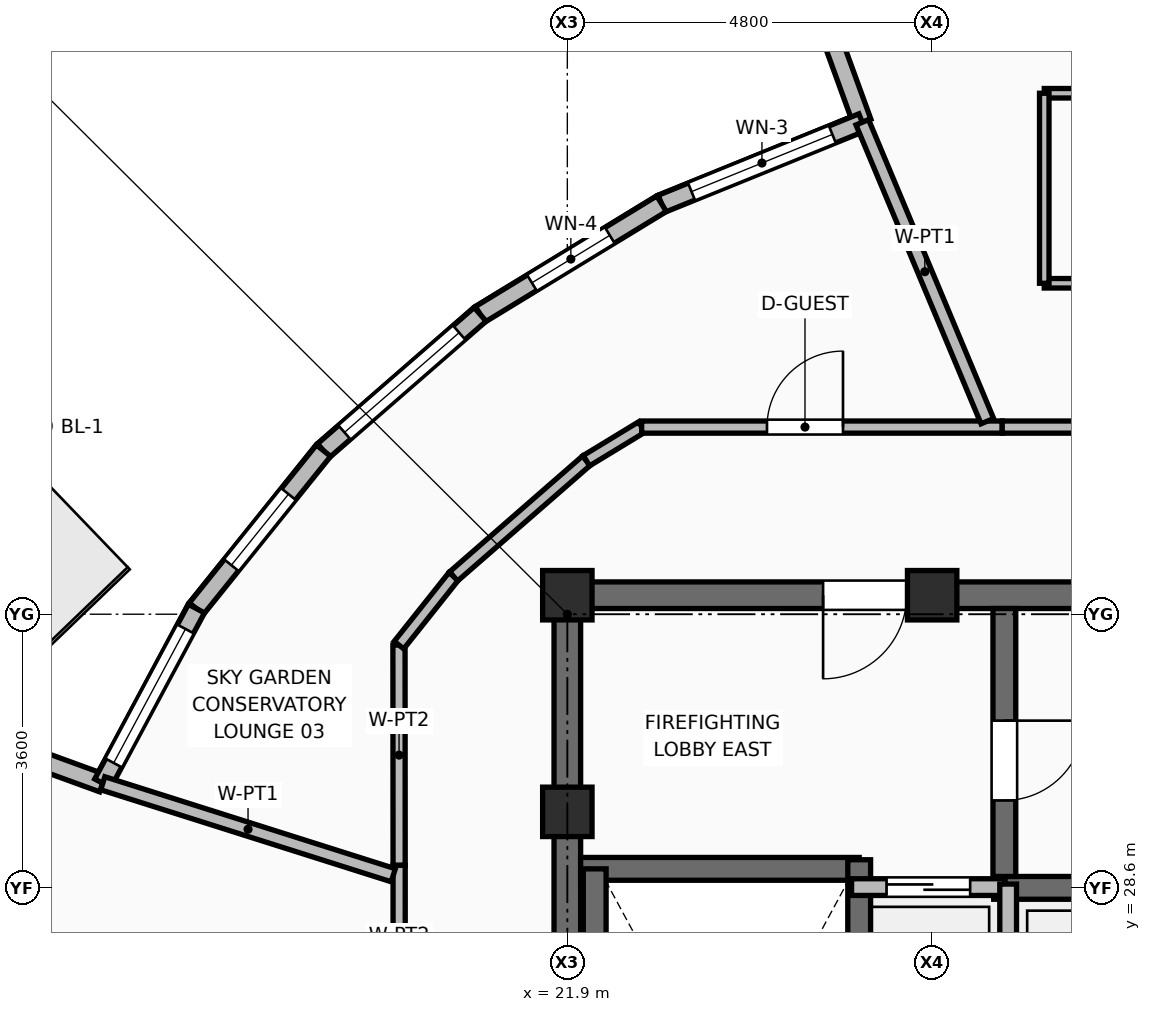
"""IFC4 building model, lengths in metres.
Left out: names, types, materials, properties, quantities, classifications, styles, units other than length and angle.
Written with IfcOpenShell. Run it as: python <this file> out.ifc"""

import sys

from ifc_helpers import new_model, si_unit, direction, frame, frame_2d, origin, origin_2d, place, context, subcontext, project, spatial, rectangle, extrude, element, fill, save


model = new_model("IFC4")
c1 = context("Model", 3, precision=1e-05, world=origin(), true_north=direction((0.0, 1.0)))
c2 = subcontext(c1, "Body", "Model", "MODEL_VIEW")
j1 = project(units=[si_unit("LENGTHUNIT", "METRE"), si_unit("PLANEANGLEUNIT", "RADIAN")], contexts=[c1])
p1 = place(None, origin())
s1 = spatial("IfcSite", under=j1, at=p1, CompositionType="ELEMENT")
p2 = place(p1, origin())
s2 = spatial("IfcBuilding", under=s1, at=p2, CompositionType="ELEMENT")
p3 = place(p2, frame((0.0, 0.0, 271.35)))
s3 = spatial("IfcBuildingStorey", under=s2, at=p3, CompositionType="ELEMENT", Elevation=271.35)
for number, where, z_axis, x_axis in (
    (1, (21.9, 29.6, 0.0), (0.0, 0.0, 1.0), (1.0, 0.0, 0.0)),
    (2, (21.9, 32.45, 0.0), (0.0, 0.0, 1.0), (1.0, 0.0, 0.0)),
    (3, (26.7, 32.45, 0.0), (0.0, 0.0, 1.0), (1.0, 0.0, 0.0)),
):
    element("IfcColumn", number, at=place(p3, frame(where, z_axis=z_axis, x_axis=x_axis)), inside=s3, PredefinedType="COLUMN", context=c2, shape_type="SweptSolid", body=[
        extrude(rectangle(XDim=0.65, YDim=0.65, at=origin_2d()), origin(), (0.0, 0.0, 1.0), 3.75),
    ])
p4 = place(p3, frame((24.619, 41.867, 0.0), z_axis=(0.0, 0.0, 1.0), x_axis=(0.341835319025, -0.939759870747, 0.0)))
e4 = element("IfcWall", 4, at=p4, inside=s3, PredefinedType="SOLIDWALL", context=c2, shape_type="SweptSolid", body=[
    extrude(rectangle(XDim=3.4, YDim=0.24, at=frame_2d((1.7, 0.0))), origin(), (0.0, 0.0, 1.0), 3.57),
])
p5 = place(p3, frame((15.788, 29.976, 0.0), z_axis=(0.0, 0.0, 1.0), x_axis=(-0.939699046647, 0.342002487902, 0.0)))
e5 = element("IfcWall", 5, at=p5, inside=s3, PredefinedType="SOLIDWALL", context=c2, shape_type="SweptSolid", body=[
    extrude(rectangle(XDim=3.4, YDim=0.24, at=frame_2d((1.7, 0.0))), origin(), (0.0, 0.0, 1.0), 3.57),
])
p6 = place(p3, frame((25.781, 38.672, 0.0), z_axis=(0.0, 0.0, 1.0), x_axis=(-0.926580401984, -0.37609674109, 0.0)))
e6 = element("IfcWall", 6, at=p6, inside=s3, PredefinedType="SOLIDWALL", context=c2, shape_type="SweptSolid", body=[
    extrude(rectangle(XDim=2.85, YDim=0.24, at=frame_2d((1.425, 0.0))), origin(), (0.0, 0.0, 1.0), 3.57),
])
p7 = place(p6, frame((0.425, 0.0, 0.85)))
e7 = element("IfcOpeningElement", 7, at=p7, cuts=e6, PredefinedType="OPENING", context=c2, shape_type="SweptSolid", body=[
    extrude(rectangle(XDim=2.0, YDim=2.4, at=frame_2d((1.0, 1.2))), frame((0.0, 0.13, 0.0), z_axis=(0.0, -1.0, 0.0), x_axis=(1.0, 0.0, 0.0)), (0.0, 0.0, 1.0), 0.26),
])
p8 = place(p3, frame((23.14, 37.6, 0.0), z_axis=(0.0, 0.0, 1.0), x_axis=(-0.853857712161, -0.520506491202, 0.0)))
e8 = element("IfcWall", 8, at=p8, inside=s3, PredefinedType="SOLIDWALL", context=c2, shape_type="SweptSolid", body=[
    extrude(rectangle(XDim=2.795, YDim=0.24, at=frame_2d((1.398, 0.0))), origin(), (0.0, 0.0, 1.0), 3.57),
])
p9 = place(p8, frame((0.798, 0.0, 0.85)))
e9 = element("IfcOpeningElement", 9, at=p9, cuts=e8, PredefinedType="OPENING", context=c2, shape_type="SweptSolid", body=[
    extrude(rectangle(XDim=1.2, YDim=1.8, at=frame_2d((0.6, 0.9))), frame((0.0, 0.13, 0.0), z_axis=(0.0, -1.0, 0.0), x_axis=(1.0, 0.0, 0.0)), (0.0, 0.0, 1.0), 0.26),
])
p10 = place(p3, frame((20.753, 36.145, 0.0), z_axis=(0.0, 0.0, 1.0), x_axis=(-0.754466976039, -0.656338009006, 0.0)))
e10 = element("IfcWall", 10, at=p10, inside=s3, PredefinedType="SOLIDWALL", context=c2, shape_type="SweptSolid", body=[
    extrude(rectangle(XDim=2.732, YDim=0.24, at=frame_2d((1.366, 0.0))), origin(), (0.0, 0.0, 1.0), 3.57),
])
p11 = place(p10, frame((0.366, 0.0, 0.85)))
e11 = element("IfcOpeningElement", 11, at=p11, cuts=e10, PredefinedType="OPENING", context=c2, shape_type="SweptSolid", body=[
    extrude(rectangle(XDim=2.0, YDim=2.4, at=frame_2d((1.0, 1.2))), frame((0.0, 0.13, 0.0), z_axis=(0.0, -1.0, 0.0), x_axis=(1.0, 0.0, 0.0)), (0.0, 0.0, 1.0), 0.26),
])
p12 = place(p3, frame((18.692, 34.352, 0.0), z_axis=(0.0, 0.0, 1.0), x_axis=(-0.626835967665, -0.779151249528, 0.0)))
e12 = element("IfcWall", 12, at=p12, inside=s3, PredefinedType="SOLIDWALL", context=c2, shape_type="SweptSolid", body=[
    extrude(rectangle(XDim=2.667, YDim=0.24, at=frame_2d((1.333, 0.0))), origin(), (0.0, 0.0, 1.0), 3.57),
])
p13 = place(p12, frame((0.734, 0.0, 0.85)))
e13 = element("IfcOpeningElement", 13, at=p13, cuts=e12, PredefinedType="OPENING", context=c2, shape_type="SweptSolid", body=[
    extrude(rectangle(XDim=1.2, YDim=1.8, at=frame_2d((0.6, 0.9))), frame((0.0, 0.13, 0.0), z_axis=(0.0, -1.0, 0.0), x_axis=(1.0, 0.0, 0.0)), (0.0, 0.0, 1.0), 0.26),
])
p14 = place(p3, frame((17.02, 32.274, 0.0), z_axis=(0.0, 0.0, 1.0), x_axis=(-0.472502026954, -0.881329583371, 0.0)))
e14 = element("IfcWall", 14, at=p14, inside=s3, PredefinedType="SOLIDWALL", context=c2, shape_type="SweptSolid", body=[
    extrude(rectangle(XDim=2.607, YDim=0.24, at=frame_2d((1.304, 0.0))), origin(), (0.0, 0.0, 1.0), 3.57),
])
p15 = place(p14, frame((0.304, 0.0, 0.85)))
e15 = element("IfcOpeningElement", 15, at=p15, cuts=e14, PredefinedType="OPENING", context=c2, shape_type="SweptSolid", body=[
    extrude(rectangle(XDim=2.0, YDim=2.4, at=frame_2d((1.0, 1.2))), frame((0.0, 0.13, 0.0), z_axis=(0.0, -1.0, 0.0), x_axis=(1.0, 0.0, 0.0)), (0.0, 0.0, 1.0), 0.26),
])
p16 = place(p3, frame((21.725, 32.45, 0.0), z_axis=(0.0, 0.0, 1.0), x_axis=(1.0, 0.0, 0.0)))
e16 = element("IfcWall", 16, at=p16, inside=s3, PredefinedType="SHEAR", context=c2, shape_type="SweptSolid", body=[
    extrude(rectangle(XDim=19.55, YDim=0.35, at=frame_2d((9.775, 0.0))), origin(), (0.0, 0.0, 1.0), 3.57),
])
p17 = place(p16, frame((3.54, 0.0, 0.0)))
e17 = element("IfcOpeningElement", 17, at=p17, cuts=e16, PredefinedType="OPENING", context=c2, shape_type="SweptSolid", body=[
    extrude(rectangle(XDim=1.1, YDim=2.1, at=frame_2d((0.55, 1.05))), frame((0.0, 0.185, 0.0), z_axis=(0.0, -1.0, 0.0), x_axis=(1.0, 0.0, 0.0)), (0.0, 0.0, 1.0), 0.37),
])
p18 = place(p16, frame((15.415, 0.0, 0.0)))
e18 = element("IfcOpeningElement", 18, at=p18, cuts=e16, PredefinedType="OPENING", context=c2, shape_type="SweptSolid", body=[
    extrude(rectangle(XDim=1.0, YDim=2.1, at=frame_2d((0.5, 1.05))), frame((0.0, 0.185, 0.0), z_axis=(0.0, -1.0, 0.0), x_axis=(1.0, 0.0, 0.0)), (0.0, 0.0, 1.0), 0.37),
])
p19 = place(p16, frame((17.425, 0.0, 0.0)))
e19 = element("IfcOpeningElement", 19, at=p19, cuts=e16, PredefinedType="OPENING", context=c2, shape_type="SweptSolid", body=[
    extrude(rectangle(XDim=0.9, YDim=2.1, at=frame_2d((0.45, 1.05))), frame((0.0, 0.185, 0.0), z_axis=(0.0, -1.0, 0.0), x_axis=(1.0, 0.0, 0.0)), (0.0, 0.0, 1.0), 0.37),
])
p20 = place(p3, frame((21.9, 17.975, 0.0), z_axis=(0.0, 0.0, 1.0), x_axis=(0.0, 1.0, 0.0)))
e20 = element("IfcWall", 20, at=p20, inside=s3, PredefinedType="SHEAR", context=c2, shape_type="SweptSolid", body=[
    extrude(rectangle(XDim=14.3, YDim=0.35, at=frame_2d((7.15, 0.0))), origin(), (0.0, 0.0, 1.0), 3.57),
])
p21 = place(p3, frame((22.075, 28.85, 0.0), z_axis=(0.0, 0.0, 1.0), x_axis=(1.0, 0.0, 0.0)))
e21 = element("IfcWall", 21, at=p21, inside=s3, PredefinedType="SHEAR", context=c2, shape_type="SweptSolid", body=[
    extrude(rectangle(XDim=3.665, YDim=0.3, at=frame_2d((1.833, 0.0))), origin(), (0.0, 0.0, 1.0), 3.57),
])
p22 = place(p3, frame((25.74, 20.98, 0.0), z_axis=(0.0, 0.0, 1.0), x_axis=(0.0, 1.0, 0.0)))
e22 = element("IfcWall", 22, at=p22, inside=s3, PredefinedType="SHEAR", context=c2, shape_type="SweptSolid", body=[
    extrude(rectangle(XDim=7.99, YDim=0.3, at=frame_2d((3.995, 0.0))), origin(), (0.0, 0.0, 1.0), 3.57),
])
p23 = place(p3, frame((22.26, 21.1, 0.0), z_axis=(0.0, 0.0, 1.0), x_axis=(0.0, 1.0, 0.0)))
e23 = element("IfcWall", 23, at=p23, inside=s3, PredefinedType="SHEAR", context=c2, shape_type="SweptSolid", body=[
    extrude(rectangle(XDim=7.75, YDim=0.3, at=frame_2d((3.875, 0.0))), origin(), (0.0, 0.0, 1.0), 3.57),
])
p24 = place(p3, frame((27.51, 28.6, 0.0), z_axis=(0.0, 0.0, 1.0), x_axis=(1.0, 0.0, 0.0)))
e24 = element("IfcWall", 24, at=p24, inside=s3, PredefinedType="SHEAR", context=c2, shape_type="SweptSolid", body=[
    extrude(rectangle(XDim=8.03, YDim=0.3, at=frame_2d((4.015, 0.0))), origin(), (0.0, 0.0, 1.0), 3.57),
])
p25 = place(p3, frame((27.65, 28.75, 0.0), z_axis=(0.0, 0.0, 1.0), x_axis=(0.0, 1.0, 0.0)))
e25 = element("IfcWall", 25, at=p25, inside=s3, PredefinedType="SHEAR", context=c2, shape_type="SweptSolid", body=[
    extrude(rectangle(XDim=3.525, YDim=0.3, at=frame_2d((1.762, 0.0))), origin(), (0.0, 0.0, 1.0), 3.57),
])
p26 = place(p25, frame((1.0, 0.0, 0.0)))
e26 = element("IfcOpeningElement", 26, at=p26, cuts=e25, PredefinedType="OPENING", context=c2, shape_type="SweptSolid", body=[
    extrude(rectangle(XDim=1.05, YDim=2.1, at=frame_2d((0.525, 1.05))), frame((0.0, 0.16, 0.0), z_axis=(0.0, -1.0, 0.0), x_axis=(1.0, 0.0, 0.0)), (0.0, 0.0, 1.0), 0.32),
])
p27 = place(p3, frame((25.64, 28.61, 0.0), z_axis=(0.0, 0.0, 1.0), x_axis=(1.0, 0.0, 0.0)))
e27 = element("IfcWall", 27, at=p27, inside=s3, PredefinedType="PARTITIONING", context=c2, shape_type="SweptSolid", body=[
    extrude(rectangle(XDim=2.02, YDim=0.22, at=frame_2d((1.01, 0.0))), origin(), (0.0, 0.0, 1.0), 3.55),
])
p28 = place(p27, frame((0.46, 0.0, 0.0)))
e28 = element("IfcOpeningElement", 28, at=p28, cuts=e27, PredefinedType="OPENING", context=c2, shape_type="SweptSolid", body=[
    extrude(rectangle(XDim=1.1, YDim=2.2, at=frame_2d((0.55, 1.1))), frame((0.0, 0.12, 0.0), z_axis=(0.0, -1.0, 0.0), x_axis=(1.0, 0.0, 0.0)), (0.0, 0.0, 1.0), 0.24),
])
p29 = place(p3, frame((27.7, 25.65, 0.0), z_axis=(0.0, 0.0, 1.0), x_axis=(0.0, 1.0, 0.0)))
e29 = element("IfcWall", 29, at=p29, inside=s3, PredefinedType="PARTITIONING", context=c2, shape_type="SweptSolid", body=[
    extrude(rectangle(XDim=3.0, YDim=0.22, at=frame_2d((1.5, 0.0))), origin(), (0.0, 0.0, 1.0), 3.55),
])
p30 = place(p3, frame((19.688, 26.135, 0.0), z_axis=(0.0, 0.0, 1.0), x_axis=(-0.000353325656, 0.99999993758, 0.0)))
e30 = element("IfcWall", 30, at=p30, inside=s3, PredefinedType="PARTITIONING", context=c2, shape_type="SweptSolid", body=[
    extrude(rectangle(XDim=2.764, YDim=0.16, at=frame_2d((1.382, 0.0))), origin(), (0.0, 0.0, 1.0), 3.55),
])
p31 = place(p3, frame((19.687, 28.899, 0.0), z_axis=(0.0, 0.0, 1.0), x_axis=(-0.000674649872, 0.999999772424, 0.0)))
e31 = element("IfcWall", 31, at=p31, inside=s3, PredefinedType="PARTITIONING", context=c2, shape_type="SweptSolid", body=[
    extrude(rectangle(XDim=2.895, YDim=0.16, at=frame_2d((1.448, 0.0))), origin(), (0.0, 0.0, 1.0), 3.55),
])
p32 = place(p3, frame((19.685, 31.794, 0.0), z_axis=(0.0, 0.0, 1.0), x_axis=(0.622450012277, 0.782659557033, 0.0)))
e32 = element("IfcWall", 32, at=p32, inside=s3, PredefinedType="PARTITIONING", context=c2, shape_type="SweptSolid", body=[
    extrude(rectangle(XDim=1.155, YDim=0.16, at=frame_2d((0.578, 0.0))), origin(), (0.0, 0.0, 1.0), 3.132),
])
p33 = place(p3, frame((20.404, 32.698, 0.0), z_axis=(0.0, 0.0, 1.0), x_axis=(0.753965421059, 0.656914106902, 0.0)))
e33 = element("IfcWall", 33, at=p33, inside=s3, PredefinedType="PARTITIONING", context=c2, shape_type="SweptSolid", body=[
    extrude(rectangle(XDim=2.317, YDim=0.16, at=frame_2d((1.158, 0.0))), origin(), (0.0, 0.0, 1.0), 3.132),
])
p34 = place(p3, frame((22.151, 34.22, 0.0), z_axis=(0.0, 0.0, 1.0), x_axis=(0.854414553901, 0.519591926499, 0.0)))
e34 = element("IfcWall", 34, at=p34, inside=s3, PredefinedType="PARTITIONING", context=c2, shape_type="SweptSolid", body=[
    extrude(rectangle(XDim=0.851, YDim=0.16, at=frame_2d((0.425, 0.0))), origin(), (0.0, 0.0, 1.0), 3.55),
])
p35 = place(p3, frame((22.878, 34.662, 0.0), z_axis=(0.0, 0.0, 1.0), x_axis=(1.0, 0.0, 0.0)))
e35 = element("IfcWall", 35, at=p35, inside=s3, PredefinedType="PARTITIONING", context=c2, shape_type="SweptSolid", body=[
    extrude(rectangle(XDim=4.744, YDim=0.16, at=frame_2d((2.372, 0.0))), origin(), (0.0, 0.0, 1.0), 3.55),
])
p36 = place(p35, frame((1.649, 0.0, 0.0)))
e36 = element("IfcOpeningElement", 36, at=p36, cuts=e35, PredefinedType="OPENING", context=c2, shape_type="SweptSolid", body=[
    extrude(rectangle(XDim=1.0, YDim=2.1, at=frame_2d((0.5, 1.05))), frame((0.0, 0.09, 0.0), z_axis=(0.0, -1.0, 0.0), x_axis=(1.0, 0.0, 0.0)), (0.0, 0.0, 1.0), 0.18),
])
p37 = place(p3, frame((27.622, 34.662, 0.0), z_axis=(0.0, 0.0, 1.0), x_axis=(0.999999992594, -0.000121704841, 0.0)))
e37 = element("IfcWall", 37, at=p37, inside=s3, PredefinedType="PARTITIONING", context=c2, shape_type="SweptSolid", body=[
    extrude(rectangle(XDim=10.03, YDim=0.16, at=frame_2d((5.015, 0.0))), origin(), (0.0, 0.0, 1.0), 3.132),
])
p38 = place(p37, frame((4.34, 0.0, 0.0)))
e38 = element("IfcOpeningElement", 38, at=p38, cuts=e37, PredefinedType="OPENING", context=c2, shape_type="SweptSolid", body=[
    extrude(rectangle(XDim=1.2, YDim=2.1, at=frame_2d((0.6, 1.05))), frame((0.0, 0.09, 0.0), z_axis=(0.0, -1.0, 0.0), x_axis=(1.0, 0.0, 0.0)), (0.0, 0.0, 1.0), 0.18),
])
p39 = place(p3, frame((27.426, 34.74, 0.0), z_axis=(0.0, 0.0, 1.0), x_axis=(-0.385940860764, 0.922523523815, 0.0)))
e39 = element("IfcWall", 39, at=p39, inside=s3, PredefinedType="PARTITIONING", context=c2, shape_type="SweptSolid", body=[
    extrude(rectangle(XDim=4.262, YDim=0.18, at=frame_2d((2.131, 0.0))), origin(), (0.0, 0.0, 1.0), 3.55),
])
p40 = place(p3, frame((19.61, 28.766, 0.0), z_axis=(0.0, 0.0, 1.0), x_axis=(-0.953367052014, 0.301813293502, 0.0)))
e40 = element("IfcWall", 40, at=p40, inside=s3, PredefinedType="PARTITIONING", context=c2, shape_type="SweptSolid", body=[
    extrude(rectangle(XDim=4.009, YDim=0.18, at=frame_2d((2.004, 0.0))), origin(), (0.0, 0.0, 1.0), 3.55),
])
p41 = place(p3, frame((28.175, 36.554, 0.0), z_axis=(0.0, 0.0, 1.0), x_axis=(1.0, 0.0, 0.0)))
e41 = element("IfcWall", 41, at=p41, inside=s3, PredefinedType="PARTITIONING", context=c2, shape_type="SweptSolid", body=[
    extrude(rectangle(XDim=2.6, YDim=0.125, at=frame_2d((1.3, 0.0))), origin(), (0.0, 0.0, 1.0), 3.55),
])
p42 = place(p41, frame((0.85, 0.0, 0.0)))
e42 = element("IfcOpeningElement", 42, at=p42, cuts=e41, PredefinedType="OPENING", context=c2, shape_type="SweptSolid", body=[
    extrude(rectangle(XDim=0.9, YDim=2.1, at=frame_2d((0.45, 1.05))), frame((0.0, 0.073, 0.0), z_axis=(0.0, -1.0, 0.0), x_axis=(1.0, 0.0, 0.0)), (0.0, 0.0, 1.0), 0.145),
])
p43 = place(p3, frame((28.175, 39.054, 0.0), z_axis=(0.0, 0.0, 1.0), x_axis=(1.0, 0.0, 0.0)))
e43 = element("IfcWall", 43, at=p43, inside=s3, PredefinedType="PARTITIONING", context=c2, shape_type="SweptSolid", body=[
    extrude(rectangle(XDim=2.6, YDim=0.125, at=frame_2d((1.3, 0.0))), origin(), (0.0, 0.0, 1.0), 3.55),
])
p44 = place(p3, frame((28.175, 36.554, 0.0), z_axis=(0.0, 0.0, 1.0), x_axis=(0.0, 1.0, 0.0)))
e44 = element("IfcWall", 44, at=p44, inside=s3, PredefinedType="PARTITIONING", context=c2, shape_type="SweptSolid", body=[
    extrude(rectangle(XDim=2.5, YDim=0.125, at=frame_2d((1.25, 0.0))), origin(), (0.0, 0.0, 1.0), 3.55),
])
p45 = place(p7, origin())
e45 = element("IfcWindow", 45, at=p45, inside=s3, PartitioningType="SINGLE_PANEL", PredefinedType="WINDOW", context=c2, shape_type="SweptSolid", body=[
    extrude(rectangle(XDim=2.0, YDim=2.4, at=frame_2d((1.0, 1.2))), frame((0.0, 0.03, 0.0), z_axis=(0.0, -1.0, 0.0), x_axis=(1.0, 0.0, 0.0)), (0.0, 0.0, 1.0), 0.06),
])
fill(e7, e45)
p46 = place(p9, origin())
e46 = element("IfcWindow", 46, at=p46, inside=s3, PartitioningType="SINGLE_PANEL", PredefinedType="WINDOW", context=c2, shape_type="SweptSolid", body=[
    extrude(rectangle(XDim=1.2, YDim=1.8, at=frame_2d((0.6, 0.9))), frame((0.0, 0.03, 0.0), z_axis=(0.0, -1.0, 0.0), x_axis=(1.0, 0.0, 0.0)), (0.0, 0.0, 1.0), 0.06),
])
fill(e9, e46)
p47 = place(p11, origin())
e47 = element("IfcWindow", 47, at=p47, inside=s3, PartitioningType="SINGLE_PANEL", PredefinedType="WINDOW", context=c2, shape_type="SweptSolid", body=[
    extrude(rectangle(XDim=2.0, YDim=2.4, at=frame_2d((1.0, 1.2))), frame((0.0, 0.03, 0.0), z_axis=(0.0, -1.0, 0.0), x_axis=(1.0, 0.0, 0.0)), (0.0, 0.0, 1.0), 0.06),
])
fill(e11, e47)
p48 = place(p13, origin())
e48 = element("IfcWindow", 48, at=p48, inside=s3, PartitioningType="SINGLE_PANEL", PredefinedType="WINDOW", context=c2, shape_type="SweptSolid", body=[
    extrude(rectangle(XDim=1.2, YDim=1.8, at=frame_2d((0.6, 0.9))), frame((0.0, 0.03, 0.0), z_axis=(0.0, -1.0, 0.0), x_axis=(1.0, 0.0, 0.0)), (0.0, 0.0, 1.0), 0.06),
])
fill(e13, e48)
p49 = place(p15, origin())
e49 = element("IfcWindow", 49, at=p49, inside=s3, PartitioningType="SINGLE_PANEL", PredefinedType="WINDOW", context=c2, shape_type="SweptSolid", body=[
    extrude(rectangle(XDim=2.0, YDim=2.4, at=frame_2d((1.0, 1.2))), frame((0.0, 0.03, 0.0), z_axis=(0.0, -1.0, 0.0), x_axis=(1.0, 0.0, 0.0)), (0.0, 0.0, 1.0), 0.06),
])
fill(e15, e49)
p50 = place(p26, frame((1.05, 0.0, 0.0), z_axis=(0.0, 0.0, 1.0), x_axis=(-1.0, 0.0, 0.0)))
e50 = element("IfcDoor", 50, at=p50, inside=s3, OperationType="SINGLE_SWING_LEFT", PredefinedType="DOOR", context=c2, shape_type="SweptSolid", body=[
    extrude(rectangle(XDim=1.05, YDim=2.1, at=frame_2d((0.525, 1.05))), frame((0.0, 0.025, 0.0), z_axis=(0.0, -1.0, 0.0), x_axis=(1.0, 0.0, 0.0)), (0.0, 0.0, 1.0), 0.05),
])
fill(e26, e50)
p51 = place(p28, origin())
e51 = element("IfcDoor", 51, at=p51, inside=s3, OperationType="DOUBLE_DOOR_SLIDING", PredefinedType="DOOR", context=c2, shape_type="SweptSolid", body=[
    extrude(rectangle(XDim=1.1, YDim=2.2, at=frame_2d((0.55, 1.1))), frame((0.0, 0.025, 0.0), z_axis=(0.0, -1.0, 0.0), x_axis=(1.0, 0.0, 0.0)), (0.0, 0.0, 1.0), 0.05),
])
fill(e28, e51)
p52 = place(p17, frame((1.1, 0.0, 0.0), z_axis=(0.0, 0.0, 1.0), x_axis=(-1.0, 0.0, 0.0)))
e52 = element("IfcDoor", 52, at=p52, inside=s3, OperationType="SINGLE_SWING_RIGHT", PredefinedType="DOOR", context=c2, shape_type="SweptSolid", body=[
    extrude(rectangle(XDim=1.1, YDim=2.1, at=frame_2d((0.55, 1.05))), frame((0.0, 0.025, 0.0), z_axis=(0.0, -1.0, 0.0), x_axis=(1.0, 0.0, 0.0)), (0.0, 0.0, 1.0), 0.05),
])
fill(e17, e52)
p53 = place(p36, origin())
e53 = element("IfcDoor", 53, at=p53, inside=s3, OperationType="SINGLE_SWING_RIGHT", PredefinedType="DOOR", context=c2, shape_type="SweptSolid", body=[
    extrude(rectangle(XDim=1.0, YDim=2.1, at=frame_2d((0.5, 1.05))), frame((0.0, 0.025, 0.0), z_axis=(0.0, -1.0, 0.0), x_axis=(1.0, 0.0, 0.0)), (0.0, 0.0, 1.0), 0.05),
])
fill(e36, e53)
save(model, sys.argv[1])
